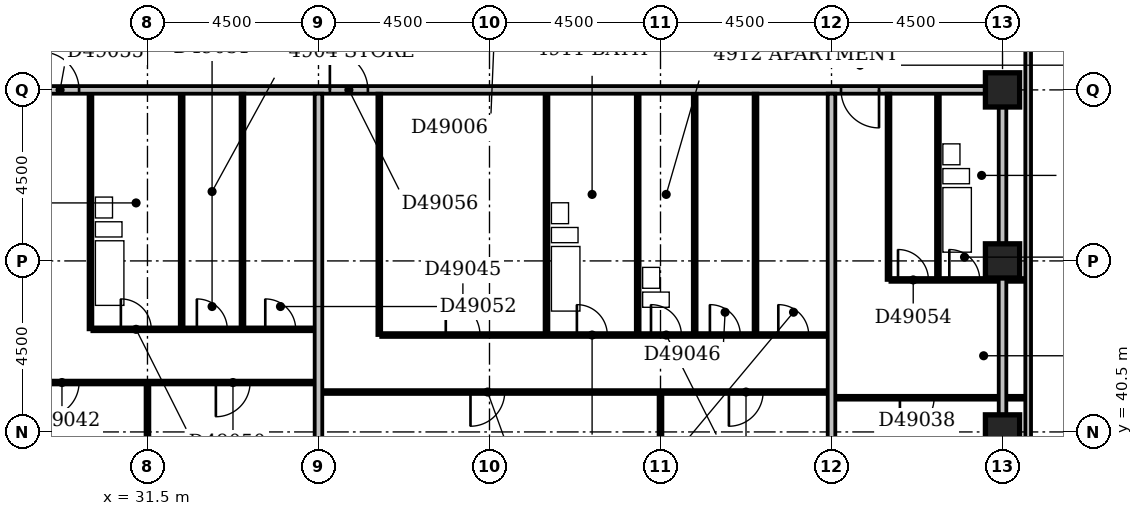
"""IFC4 building model, lengths in metres.
Left out: names, types, materials, properties, quantities, classifications, styles, units other than length and angle.
Written with IfcOpenShell. Run it as: python <this file> out.ifc"""

import sys

from ifc_helpers import new_model, si_unit, direction, frame, frame_2d, origin, origin_2d, place, context, subcontext, project, spatial, rectangle, extrude, element, fill, save


model = new_model("IFC4")
c1 = context("Model", 3, precision=1e-05, world=origin(), true_north=direction((0.0, 1.0)))
c2 = subcontext(c1, "Body", "Model", "MODEL_VIEW")
j1 = project(units=[si_unit("LENGTHUNIT", "METRE"), si_unit("PLANEANGLEUNIT", "RADIAN")], contexts=[c1])
p1 = place(None, origin())
s1 = spatial("IfcSite", under=j1, at=p1, CompositionType="ELEMENT")
p2 = place(p1, origin())
s2 = spatial("IfcBuilding", under=s1, at=p2, CompositionType="ELEMENT")
p3 = place(p2, frame((0.0, 0.0, 193.4)))
s3 = spatial("IfcBuildingStorey", under=s2, at=p3, CompositionType="ELEMENT", Elevation=193.4)
for number, where, z_axis, x_axis in (
    (1, (54.0, 40.5, -0.3), (0.0, 0.0, 1.0), (1.0, 0.0, 0.0)),
    (2, (54.0, 45.0, -0.3), (0.0, 0.0, 1.0), (1.0, 0.0, 0.0)),
    (3, (54.0, 49.5, -0.3), (0.0, 0.0, 1.0), (1.0, 0.0, 0.0)),
):
    element("IfcColumn", number, at=place(p3, frame(where, z_axis=z_axis, x_axis=x_axis)), inside=s3, PredefinedType="COLUMN", context=c2, shape_type="SweptSolid", body=[
        extrude(rectangle(XDim=0.9, YDim=0.9, at=origin_2d()), origin(), (0.0, 0.0, 1.0), 3.6),
    ])
p4 = place(p3, frame((54.675, 39.9, 0.0), z_axis=(0.0, 0.0, 1.0), x_axis=(0.0, 1.0, 0.0)))
e4 = element("IfcWall", 4, at=p4, inside=s3, PredefinedType="STANDARD", context=c2, shape_type="SweptSolid", body=[
    extrude(rectangle(XDim=14.85, YDim=0.15, at=frame_2d((7.425, 0.0))), origin(), (0.0, 0.0, 1.0), 2.7),
])
p5 = place(p3, frame((31.5, 36.45, 0.0), z_axis=(0.0, 0.0, 1.0), x_axis=(0.0, 1.0, 0.0)))
e5 = element("IfcWall", 5, at=p5, inside=s3, PredefinedType="PARTITIONING", context=c2, shape_type="SweptSolid", body=[
    extrude(rectangle(XDim=5.3, YDim=0.1, at=frame_2d((2.65, 0.0))), origin(), (0.0, 0.0, 1.0), 3.3),
])
p6 = place(p3, frame((36.0, 36.45, 0.0), z_axis=(0.0, 0.0, 1.0), x_axis=(0.0, 1.0, 0.0)))
e6 = element("IfcWall", 6, at=p6, inside=s3, PredefinedType="PARTITIONING", context=c2, shape_type="SweptSolid", body=[
    extrude(rectangle(XDim=12.95, YDim=0.2, at=frame_2d((6.475, 0.0))), origin(), (0.0, 0.0, 1.0), 2.4),
])
p7 = place(p3, frame((45.0, 36.45, 0.0), z_axis=(0.0, 0.0, 1.0), x_axis=(0.0, 1.0, 0.0)))
e7 = element("IfcWall", 7, at=p7, inside=s3, PredefinedType="PARTITIONING", context=c2, shape_type="SweptSolid", body=[
    extrude(rectangle(XDim=5.05, YDim=0.1, at=frame_2d((2.525, 0.0))), origin(), (0.0, 0.0, 1.0), 2.6),
])
p8 = place(p3, frame((49.5, 36.45, 0.0), z_axis=(0.0, 0.0, 1.0), x_axis=(0.0, 1.0, 0.0)))
e8 = element("IfcWall", 8, at=p8, inside=s3, PredefinedType="PARTITIONING", context=c2, shape_type="SweptSolid", body=[
    extrude(rectangle(XDim=12.95, YDim=0.2, at=frame_2d((6.475, 0.0))), origin(), (0.0, 0.0, 1.0), 3.3),
])
p9 = place(p3, frame((54.0, 40.95, 0.0), z_axis=(0.0, 0.0, 1.0), x_axis=(0.0, 1.0, 0.0)))
e9 = element("IfcWall", 9, at=p9, inside=s3, PredefinedType="PARTITIONING", context=c2, shape_type="SweptSolid", body=[
    extrude(rectangle(XDim=8.1, YDim=0.2, at=frame_2d((4.05, 0.0))), origin(), (0.0, 0.0, 1.0), 2.7),
])
p10 = place(p3, frame((49.6, 41.4, 0.0), z_axis=(0.0, 0.0, 1.0), x_axis=(1.0, 0.0, 0.0)))
e10 = element("IfcWall", 10, at=p10, inside=s3, PredefinedType="PARTITIONING", context=c2, shape_type="SweptSolid", body=[
    extrude(rectangle(XDim=5.0, YDim=0.1, at=frame_2d((2.5, 0.0))), origin(), (0.0, 0.0, 1.0), 3.3),
])
p11 = place(p10, frame((1.7, 0.0, 0.0)))
e11 = element("IfcOpeningElement", 11, at=p11, cuts=e10, PredefinedType="OPENING", context=c2, shape_type="SweptSolid", body=[
    extrude(rectangle(XDim=0.9, YDim=2.1, at=frame_2d((0.45, 1.05))), frame((0.0, 0.062, 0.0), z_axis=(0.0, -1.0, 0.0), x_axis=(1.0, 0.0, 0.0)), (0.0, 0.0, 1.0), 0.124),
])
p12 = place(p3, frame((36.1, 41.55, 0.0), z_axis=(0.0, 0.0, 1.0), x_axis=(1.0, 0.0, 0.0)))
e12 = element("IfcWall", 12, at=p12, inside=s3, PredefinedType="PARTITIONING", context=c2, shape_type="SweptSolid", body=[
    extrude(rectangle(XDim=13.3, YDim=0.1, at=frame_2d((6.65, 0.0))), origin(), (0.0, 0.0, 1.0), 3.3),
])
p13 = place(p12, frame((3.9, 0.0, 0.0)))
e13 = element("IfcOpeningElement", 13, at=p13, cuts=e12, PredefinedType="OPENING", context=c2, shape_type="SweptSolid", body=[
    extrude(rectangle(XDim=0.9, YDim=2.1, at=frame_2d((0.45, 1.05))), frame((0.0, 0.062, 0.0), z_axis=(0.0, -1.0, 0.0), x_axis=(1.0, 0.0, 0.0)), (0.0, 0.0, 1.0), 0.124),
])
p14 = place(p12, frame((10.7, 0.0, 0.0)))
e14 = element("IfcOpeningElement", 14, at=p14, cuts=e12, PredefinedType="OPENING", context=c2, shape_type="SweptSolid", body=[
    extrude(rectangle(XDim=0.9, YDim=2.1, at=frame_2d((0.45, 1.05))), frame((0.0, 0.062, 0.0), z_axis=(0.0, -1.0, 0.0), x_axis=(1.0, 0.0, 0.0)), (0.0, 0.0, 1.0), 0.124),
])
p15 = place(p3, frame((22.6, 41.8, 0.0), z_axis=(0.0, 0.0, 1.0), x_axis=(1.0, 0.0, 0.0)))
e15 = element("IfcWall", 15, at=p15, inside=s3, PredefinedType="PARTITIONING", context=c2, shape_type="SweptSolid", body=[
    extrude(rectangle(XDim=13.3, YDim=0.1, at=frame_2d((6.65, 0.0))), origin(), (0.0, 0.0, 1.0), 3.3),
])
p16 = place(p15, frame((1.7, 0.0, 0.0)))
e16 = element("IfcOpeningElement", 16, at=p16, cuts=e15, PredefinedType="OPENING", context=c2, shape_type="SweptSolid", body=[
    extrude(rectangle(XDim=0.9, YDim=2.1, at=frame_2d((0.45, 1.05))), frame((0.0, 0.062, 0.0), z_axis=(0.0, -1.0, 0.0), x_axis=(1.0, 0.0, 0.0)), (0.0, 0.0, 1.0), 0.124),
])
p17 = place(p15, frame((6.2, 0.0, 0.0)))
e17 = element("IfcOpeningElement", 17, at=p17, cuts=e15, PredefinedType="OPENING", context=c2, shape_type="SweptSolid", body=[
    extrude(rectangle(XDim=0.9, YDim=2.1, at=frame_2d((0.45, 1.05))), frame((0.0, 0.062, 0.0), z_axis=(0.0, -1.0, 0.0), x_axis=(1.0, 0.0, 0.0)), (0.0, 0.0, 1.0), 0.124),
])
p18 = place(p15, frame((10.7, 0.0, 0.0)))
e18 = element("IfcOpeningElement", 18, at=p18, cuts=e15, PredefinedType="OPENING", context=c2, shape_type="SweptSolid", body=[
    extrude(rectangle(XDim=0.9, YDim=2.1, at=frame_2d((0.45, 1.05))), frame((0.0, 0.062, 0.0), z_axis=(0.0, -1.0, 0.0), x_axis=(1.0, 0.0, 0.0)), (0.0, 0.0, 1.0), 0.124),
])
p19 = place(p3, frame((37.6, 43.05, 0.0), z_axis=(0.0, 0.0, 1.0), x_axis=(0.0, 1.0, 0.0)))
e19 = element("IfcWall", 19, at=p19, inside=s3, PredefinedType="PARTITIONING", context=c2, shape_type="SweptSolid", body=[
    extrude(rectangle(XDim=6.35, YDim=0.1, at=frame_2d((3.175, 0.0))), origin(), (0.0, 0.0, 1.0), 3.3),
])
p20 = place(p3, frame((37.65, 43.05, 0.0), z_axis=(0.0, 0.0, 1.0), x_axis=(1.0, 0.0, 0.0)))
e20 = element("IfcWall", 20, at=p20, inside=s3, PredefinedType="PARTITIONING", context=c2, shape_type="SweptSolid", body=[
    extrude(rectangle(XDim=11.75, YDim=0.1, at=frame_2d((5.875, 0.0))), origin(), (0.0, 0.0, 1.0), 3.3),
])
p21 = place(p20, frame((5.15, 0.0, 0.0)))
e21 = element("IfcOpeningElement", 21, at=p21, cuts=e20, PredefinedType="OPENING", context=c2, shape_type="SweptSolid", body=[
    extrude(rectangle(XDim=0.8, YDim=2.1, at=frame_2d((0.4, 1.05))), frame((0.0, 0.062, 0.0), z_axis=(0.0, -1.0, 0.0), x_axis=(1.0, 0.0, 0.0)), (0.0, 0.0, 1.0), 0.124),
])
p22 = place(p20, frame((1.7, 0.0, 0.0)))
e22 = element("IfcOpeningElement", 22, at=p22, cuts=e20, PredefinedType="OPENING", context=c2, shape_type="SweptSolid", body=[
    extrude(rectangle(XDim=0.9, YDim=2.1, at=frame_2d((0.45, 1.05))), frame((0.0, 0.062, 0.0), z_axis=(0.0, -1.0, 0.0), x_axis=(1.0, 0.0, 0.0)), (0.0, 0.0, 1.0), 0.124),
])
p23 = place(p20, frame((8.65, 0.0, 0.0)))
e23 = element("IfcOpeningElement", 23, at=p23, cuts=e20, PredefinedType="OPENING", context=c2, shape_type="SweptSolid", body=[
    extrude(rectangle(XDim=0.8, YDim=2.1, at=frame_2d((0.4, 1.05))), frame((0.0, 0.062, 0.0), z_axis=(0.0, -1.0, 0.0), x_axis=(1.0, 0.0, 0.0)), (0.0, 0.0, 1.0), 0.124),
])
p24 = place(p20, frame((10.45, 0.0, 0.0)))
e24 = element("IfcOpeningElement", 24, at=p24, cuts=e20, PredefinedType="OPENING", context=c2, shape_type="SweptSolid", body=[
    extrude(rectangle(XDim=0.8, YDim=2.1, at=frame_2d((0.4, 1.05))), frame((0.0, 0.062, 0.0), z_axis=(0.0, -1.0, 0.0), x_axis=(1.0, 0.0, 0.0)), (0.0, 0.0, 1.0), 0.124),
])
p25 = place(p20, frame((7.1, 0.0, 0.0)))
e25 = element("IfcOpeningElement", 25, at=p25, cuts=e20, PredefinedType="OPENING", context=c2, shape_type="SweptSolid", body=[
    extrude(rectangle(XDim=0.8, YDim=2.1, at=frame_2d((0.4, 1.05))), frame((0.0, 0.062, 0.0), z_axis=(0.0, -1.0, 0.0), x_axis=(1.0, 0.0, 0.0)), (0.0, 0.0, 1.0), 0.124),
])
p26 = place(p3, frame((42.0, 43.1, 0.0), z_axis=(0.0, 0.0, 1.0), x_axis=(0.0, 1.0, 0.0)))
e26 = element("IfcWall", 26, at=p26, inside=s3, PredefinedType="PLUMBINGWALL", context=c2, shape_type="SweptSolid", body=[
    extrude(rectangle(XDim=6.3, YDim=0.1, at=frame_2d((3.15, 0.0))), origin(), (0.0, 0.0, 1.0), 3.3),
])
p27 = place(p3, frame((44.4, 43.1, 0.0), z_axis=(0.0, 0.0, 1.0), x_axis=(0.0, 1.0, 0.0)))
e27 = element("IfcWall", 27, at=p27, inside=s3, PredefinedType="PLUMBINGWALL", context=c2, shape_type="SweptSolid", body=[
    extrude(rectangle(XDim=6.3, YDim=0.1, at=frame_2d((3.15, 0.0))), origin(), (0.0, 0.0, 1.0), 2.6),
])
p28 = place(p3, frame((45.9, 43.1, 0.0), z_axis=(0.0, 0.0, 1.0), x_axis=(0.0, 1.0, 0.0)))
e28 = element("IfcWall", 28, at=p28, inside=s3, PredefinedType="PLUMBINGWALL", context=c2, shape_type="SweptSolid", body=[
    extrude(rectangle(XDim=6.3, YDim=0.1, at=frame_2d((3.15, 0.0))), origin(), (0.0, 0.0, 1.0), 3.3),
])
p29 = place(p3, frame((47.5, 43.1, 0.0), z_axis=(0.0, 0.0, 1.0), x_axis=(0.0, 1.0, 0.0)))
e29 = element("IfcWall", 29, at=p29, inside=s3, PredefinedType="PARTITIONING", context=c2, shape_type="SweptSolid", body=[
    extrude(rectangle(XDim=6.3, YDim=0.1, at=frame_2d((3.15, 0.0))), origin(), (0.0, 0.0, 1.0), 3.3),
])
p30 = place(p3, frame((30.0, 43.2, 0.0), z_axis=(0.0, 0.0, 1.0), x_axis=(0.0, 1.0, 0.0)))
e30 = element("IfcWall", 30, at=p30, inside=s3, PredefinedType="PLUMBINGWALL", context=c2, shape_type="SweptSolid", body=[
    extrude(rectangle(XDim=6.2, YDim=0.1, at=frame_2d((3.1, 0.0))), origin(), (0.0, 0.0, 1.0), 3.3),
])
p31 = place(p3, frame((30.05, 43.2, 0.0), z_axis=(0.0, 0.0, 1.0), x_axis=(1.0, 0.0, 0.0)))
e31 = element("IfcWall", 31, at=p31, inside=s3, PredefinedType="PARTITIONING", context=c2, shape_type="SweptSolid", body=[
    extrude(rectangle(XDim=5.85, YDim=0.1, at=frame_2d((2.925, 0.0))), origin(), (0.0, 0.0, 1.0), 3.3),
])
p32 = place(p31, frame((0.75, 0.0, 0.0)))
e32 = element("IfcOpeningElement", 32, at=p32, cuts=e31, PredefinedType="OPENING", context=c2, shape_type="SweptSolid", body=[
    extrude(rectangle(XDim=0.8, YDim=2.1, at=frame_2d((0.4, 1.05))), frame((0.0, 0.062, 0.0), z_axis=(0.0, -1.0, 0.0), x_axis=(1.0, 0.0, 0.0)), (0.0, 0.0, 1.0), 0.124),
])
p33 = place(p31, frame((2.75, 0.0, 0.0)))
e33 = element("IfcOpeningElement", 33, at=p33, cuts=e31, PredefinedType="OPENING", context=c2, shape_type="SweptSolid", body=[
    extrude(rectangle(XDim=0.8, YDim=2.1, at=frame_2d((0.4, 1.05))), frame((0.0, 0.062, 0.0), z_axis=(0.0, -1.0, 0.0), x_axis=(1.0, 0.0, 0.0)), (0.0, 0.0, 1.0), 0.124),
])
p34 = place(p31, frame((4.55, 0.0, 0.0)))
e34 = element("IfcOpeningElement", 34, at=p34, cuts=e31, PredefinedType="OPENING", context=c2, shape_type="SweptSolid", body=[
    extrude(rectangle(XDim=0.8, YDim=2.1, at=frame_2d((0.4, 1.05))), frame((0.0, 0.062, 0.0), z_axis=(0.0, -1.0, 0.0), x_axis=(1.0, 0.0, 0.0)), (0.0, 0.0, 1.0), 0.124),
])
p35 = place(p3, frame((32.4, 43.25, 0.0), z_axis=(0.0, 0.0, 1.0), x_axis=(0.0, 1.0, 0.0)))
e35 = element("IfcWall", 35, at=p35, inside=s3, PredefinedType="PLUMBINGWALL", context=c2, shape_type="SweptSolid", body=[
    extrude(rectangle(XDim=6.15, YDim=0.1, at=frame_2d((3.075, 0.0))), origin(), (0.0, 0.0, 1.0), 3.3),
])
p36 = place(p3, frame((34.0, 43.25, 0.0), z_axis=(0.0, 0.0, 1.0), x_axis=(0.0, 1.0, 0.0)))
e36 = element("IfcWall", 36, at=p36, inside=s3, PredefinedType="PARTITIONING", context=c2, shape_type="SweptSolid", body=[
    extrude(rectangle(XDim=6.15, YDim=0.1, at=frame_2d((3.075, 0.0))), origin(), (0.0, 0.0, 1.0), 3.3),
])
p37 = place(p3, frame((51.0, 44.5, 0.0), z_axis=(0.0, 0.0, 1.0), x_axis=(0.0, 1.0, 0.0)))
e37 = element("IfcWall", 37, at=p37, inside=s3, PredefinedType="PARTITIONING", context=c2, shape_type="SweptSolid", body=[
    extrude(rectangle(XDim=4.9, YDim=0.1, at=frame_2d((2.45, 0.0))), origin(), (0.0, 0.0, 1.0), 3.3),
])
p38 = place(p3, frame((51.05, 44.5, 0.0), z_axis=(0.0, 0.0, 1.0), x_axis=(1.0, 0.0, 0.0)))
e38 = element("IfcWall", 38, at=p38, inside=s3, PredefinedType="PARTITIONING", context=c2, shape_type="SweptSolid", body=[
    extrude(rectangle(XDim=3.55, YDim=0.1, at=frame_2d((1.775, 0.0))), origin(), (0.0, 0.0, 1.0), 3.3),
])
p39 = place(p38, frame((1.55, 0.0, 0.0)))
e39 = element("IfcOpeningElement", 39, at=p39, cuts=e38, PredefinedType="OPENING", context=c2, shape_type="SweptSolid", body=[
    extrude(rectangle(XDim=0.8, YDim=2.1, at=frame_2d((0.4, 1.05))), frame((0.0, 0.062, 0.0), z_axis=(0.0, -1.0, 0.0), x_axis=(1.0, 0.0, 0.0)), (0.0, 0.0, 1.0), 0.124),
])
p40 = place(p38, frame((0.2, 0.0, 0.0)))
e40 = element("IfcOpeningElement", 40, at=p40, cuts=e38, PredefinedType="OPENING", context=c2, shape_type="SweptSolid", body=[
    extrude(rectangle(XDim=0.8, YDim=2.1, at=frame_2d((0.4, 1.05))), frame((0.0, 0.062, 0.0), z_axis=(0.0, -1.0, 0.0), x_axis=(1.0, 0.0, 0.0)), (0.0, 0.0, 1.0), 0.124),
])
p41 = place(p3, frame((52.3, 44.55, 0.0), z_axis=(0.0, 0.0, 1.0), x_axis=(0.0, 1.0, 0.0)))
e41 = element("IfcWall", 41, at=p41, inside=s3, PredefinedType="PLUMBINGWALL", context=c2, shape_type="SweptSolid", body=[
    extrude(rectangle(XDim=4.85, YDim=0.1, at=frame_2d((2.425, 0.0))), origin(), (0.0, 0.0, 1.0), 3.3),
])
p42 = place(p3, frame((22.6, 49.5, 0.0), z_axis=(0.0, 0.0, 1.0), x_axis=(1.0, 0.0, 0.0)))
e42 = element("IfcWall", 42, at=p42, inside=s3, PredefinedType="PARTITIONING", context=c2, shape_type="SweptSolid", body=[
    extrude(rectangle(XDim=30.95, YDim=0.2, at=frame_2d((15.475, 0.0))), origin(), (0.0, 0.0, 1.0), 3.3),
])
p43 = place(p42, frame((6.1, 0.0, 0.0)))
e43 = element("IfcOpeningElement", 43, at=p43, cuts=e42, PredefinedType="OPENING", context=c2, shape_type="SweptSolid", body=[
    extrude(rectangle(XDim=1.0, YDim=2.1, at=frame_2d((0.5, 1.05))), frame((0.0, 0.112, 0.0), z_axis=(0.0, -1.0, 0.0), x_axis=(1.0, 0.0, 0.0)), (0.0, 0.0, 1.0), 0.224),
])
p44 = place(p42, frame((13.7, 0.0, 0.0)))
e44 = element("IfcOpeningElement", 44, at=p44, cuts=e42, PredefinedType="OPENING", context=c2, shape_type="SweptSolid", body=[
    extrude(rectangle(XDim=1.0, YDim=2.1, at=frame_2d((0.5, 1.05))), frame((0.0, 0.112, 0.0), z_axis=(0.0, -1.0, 0.0), x_axis=(1.0, 0.0, 0.0)), (0.0, 0.0, 1.0), 0.224),
])
p45 = place(p42, frame((27.15, 0.0, 0.0)))
e45 = element("IfcOpeningElement", 45, at=p45, cuts=e42, PredefinedType="OPENING", context=c2, shape_type="SweptSolid", body=[
    extrude(rectangle(XDim=1.0, YDim=2.1, at=frame_2d((0.5, 1.05))), frame((0.0, 0.112, 0.0), z_axis=(0.0, -1.0, 0.0), x_axis=(1.0, 0.0, 0.0)), (0.0, 0.0, 1.0), 0.224),
])
p46 = place(p11, frame((0.9, 0.0, 0.0), z_axis=(0.0, 0.0, 1.0), x_axis=(-1.0, 0.0, 0.0)))
e46 = element("IfcDoor", 46, at=p46, inside=s3, OperationType="SINGLE_SWING_RIGHT", PredefinedType="DOOR", context=c2, shape_type="SweptSolid", body=[
    extrude(rectangle(XDim=0.9, YDim=2.1, at=frame_2d((0.45, 1.05))), frame((0.0, 0.025, 0.0), z_axis=(0.0, -1.0, 0.0), x_axis=(1.0, 0.0, 0.0)), (0.0, 0.0, 1.0), 0.05),
])
fill(e11, e46)
p47 = place(p13, frame((0.9, 0.0, 0.0), z_axis=(0.0, 0.0, 1.0), x_axis=(-1.0, 0.0, 0.0)))
e47 = element("IfcDoor", 47, at=p47, inside=s3, OperationType="SINGLE_SWING_RIGHT", PredefinedType="DOOR", context=c2, shape_type="SweptSolid", body=[
    extrude(rectangle(XDim=0.9, YDim=2.1, at=frame_2d((0.45, 1.05))), frame((0.0, 0.025, 0.0), z_axis=(0.0, -1.0, 0.0), x_axis=(1.0, 0.0, 0.0)), (0.0, 0.0, 1.0), 0.05),
])
fill(e13, e47)
p48 = place(p14, frame((0.9, 0.0, 0.0), z_axis=(0.0, 0.0, 1.0), x_axis=(-1.0, 0.0, 0.0)))
e48 = element("IfcDoor", 48, at=p48, inside=s3, OperationType="SINGLE_SWING_RIGHT", PredefinedType="DOOR", context=c2, shape_type="SweptSolid", body=[
    extrude(rectangle(XDim=0.9, YDim=2.1, at=frame_2d((0.45, 1.05))), frame((0.0, 0.025, 0.0), z_axis=(0.0, -1.0, 0.0), x_axis=(1.0, 0.0, 0.0)), (0.0, 0.0, 1.0), 0.05),
])
fill(e14, e48)
p49 = place(p17, frame((0.9, 0.0, 0.0), z_axis=(0.0, 0.0, 1.0), x_axis=(-1.0, 0.0, 0.0)))
e49 = element("IfcDoor", 49, at=p49, inside=s3, OperationType="SINGLE_SWING_RIGHT", PredefinedType="DOOR", context=c2, shape_type="SweptSolid", body=[
    extrude(rectangle(XDim=0.9, YDim=2.1, at=frame_2d((0.45, 1.05))), frame((0.0, 0.025, 0.0), z_axis=(0.0, -1.0, 0.0), x_axis=(1.0, 0.0, 0.0)), (0.0, 0.0, 1.0), 0.05),
])
fill(e17, e49)
p50 = place(p18, frame((0.9, 0.0, 0.0), z_axis=(0.0, 0.0, 1.0), x_axis=(-1.0, 0.0, 0.0)))
e50 = element("IfcDoor", 50, at=p50, inside=s3, OperationType="SINGLE_SWING_RIGHT", PredefinedType="DOOR", context=c2, shape_type="SweptSolid", body=[
    extrude(rectangle(XDim=0.9, YDim=2.1, at=frame_2d((0.45, 1.05))), frame((0.0, 0.025, 0.0), z_axis=(0.0, -1.0, 0.0), x_axis=(1.0, 0.0, 0.0)), (0.0, 0.0, 1.0), 0.05),
])
fill(e18, e50)
p51 = place(p21, origin())
e51 = element("IfcDoor", 51, at=p51, inside=s3, OperationType="SINGLE_SWING_LEFT", PredefinedType="DOOR", context=c2, shape_type="SweptSolid", body=[
    extrude(rectangle(XDim=0.8, YDim=2.1, at=frame_2d((0.4, 1.05))), frame((0.0, 0.025, 0.0), z_axis=(0.0, -1.0, 0.0), x_axis=(1.0, 0.0, 0.0)), (0.0, 0.0, 1.0), 0.05),
])
fill(e21, e51)
p52 = place(p22, origin())
e52 = element("IfcDoor", 52, at=p52, inside=s3, OperationType="SINGLE_SWING_LEFT", PredefinedType="DOOR", context=c2, shape_type="SweptSolid", body=[
    extrude(rectangle(XDim=0.9, YDim=2.1, at=frame_2d((0.45, 1.05))), frame((0.0, 0.025, 0.0), z_axis=(0.0, -1.0, 0.0), x_axis=(1.0, 0.0, 0.0)), (0.0, 0.0, 1.0), 0.05),
])
fill(e22, e52)
p53 = place(p23, origin())
e53 = element("IfcDoor", 53, at=p53, inside=s3, OperationType="SINGLE_SWING_LEFT", PredefinedType="DOOR", context=c2, shape_type="SweptSolid", body=[
    extrude(rectangle(XDim=0.8, YDim=2.1, at=frame_2d((0.4, 1.05))), frame((0.0, 0.025, 0.0), z_axis=(0.0, -1.0, 0.0), x_axis=(1.0, 0.0, 0.0)), (0.0, 0.0, 1.0), 0.05),
])
fill(e23, e53)
p54 = place(p24, origin())
e54 = element("IfcDoor", 54, at=p54, inside=s3, OperationType="SINGLE_SWING_LEFT", PredefinedType="DOOR", context=c2, shape_type="SweptSolid", body=[
    extrude(rectangle(XDim=0.8, YDim=2.1, at=frame_2d((0.4, 1.05))), frame((0.0, 0.025, 0.0), z_axis=(0.0, -1.0, 0.0), x_axis=(1.0, 0.0, 0.0)), (0.0, 0.0, 1.0), 0.05),
])
fill(e24, e54)
p55 = place(p25, origin())
e55 = element("IfcDoor", 55, at=p55, inside=s3, OperationType="SINGLE_SWING_LEFT", PredefinedType="DOOR", context=c2, shape_type="SweptSolid", body=[
    extrude(rectangle(XDim=0.8, YDim=2.1, at=frame_2d((0.4, 1.05))), frame((0.0, 0.025, 0.0), z_axis=(0.0, -1.0, 0.0), x_axis=(1.0, 0.0, 0.0)), (0.0, 0.0, 1.0), 0.05),
])
fill(e25, e55)
p56 = place(p32, origin())
e56 = element("IfcDoor", 56, at=p56, inside=s3, OperationType="SINGLE_SWING_LEFT", PredefinedType="DOOR", context=c2, shape_type="SweptSolid", body=[
    extrude(rectangle(XDim=0.8, YDim=2.1, at=frame_2d((0.4, 1.05))), frame((0.0, 0.025, 0.0), z_axis=(0.0, -1.0, 0.0), x_axis=(1.0, 0.0, 0.0)), (0.0, 0.0, 1.0), 0.05),
])
fill(e32, e56)
p57 = place(p33, origin())
e57 = element("IfcDoor", 57, at=p57, inside=s3, OperationType="SINGLE_SWING_LEFT", PredefinedType="DOOR", context=c2, shape_type="SweptSolid", body=[
    extrude(rectangle(XDim=0.8, YDim=2.1, at=frame_2d((0.4, 1.05))), frame((0.0, 0.025, 0.0), z_axis=(0.0, -1.0, 0.0), x_axis=(1.0, 0.0, 0.0)), (0.0, 0.0, 1.0), 0.05),
])
fill(e33, e57)
p58 = place(p34, origin())
e58 = element("IfcDoor", 58, at=p58, inside=s3, OperationType="SINGLE_SWING_LEFT", PredefinedType="DOOR", context=c2, shape_type="SweptSolid", body=[
    extrude(rectangle(XDim=0.8, YDim=2.1, at=frame_2d((0.4, 1.05))), frame((0.0, 0.025, 0.0), z_axis=(0.0, -1.0, 0.0), x_axis=(1.0, 0.0, 0.0)), (0.0, 0.0, 1.0), 0.05),
])
fill(e34, e58)
p59 = place(p39, origin())
e59 = element("IfcDoor", 59, at=p59, inside=s3, OperationType="SINGLE_SWING_LEFT", PredefinedType="DOOR", context=c2, shape_type="SweptSolid", body=[
    extrude(rectangle(XDim=0.8, YDim=2.1, at=frame_2d((0.4, 1.05))), frame((0.0, 0.025, 0.0), z_axis=(0.0, -1.0, 0.0), x_axis=(1.0, 0.0, 0.0)), (0.0, 0.0, 1.0), 0.05),
])
fill(e39, e59)
p60 = place(p40, origin())
e60 = element("IfcDoor", 60, at=p60, inside=s3, OperationType="SINGLE_SWING_LEFT", PredefinedType="DOOR", context=c2, shape_type="SweptSolid", body=[
    extrude(rectangle(XDim=0.8, YDim=2.1, at=frame_2d((0.4, 1.05))), frame((0.0, 0.025, 0.0), z_axis=(0.0, -1.0, 0.0), x_axis=(1.0, 0.0, 0.0)), (0.0, 0.0, 1.0), 0.05),
])
fill(e40, e60)
p61 = place(p43, origin())
e61 = element("IfcDoor", 61, at=p61, inside=s3, OperationType="SINGLE_SWING_LEFT", PredefinedType="DOOR", context=c2, shape_type="SweptSolid", body=[
    extrude(rectangle(XDim=1.0, YDim=2.1, at=frame_2d((0.5, 1.05))), frame((0.0, 0.025, 0.0), z_axis=(0.0, -1.0, 0.0), x_axis=(1.0, 0.0, 0.0)), (0.0, 0.0, 1.0), 0.05),
])
fill(e43, e61)
p62 = place(p44, origin())
e62 = element("IfcDoor", 62, at=p62, inside=s3, OperationType="SINGLE_SWING_LEFT", PredefinedType="DOOR", context=c2, shape_type="SweptSolid", body=[
    extrude(rectangle(XDim=1.0, YDim=2.1, at=frame_2d((0.5, 1.05))), frame((0.0, 0.025, 0.0), z_axis=(0.0, -1.0, 0.0), x_axis=(1.0, 0.0, 0.0)), (0.0, 0.0, 1.0), 0.05),
])
fill(e44, e62)
p63 = place(p45, origin())
e63 = element("IfcDoor", 63, at=p63, inside=s3, OperationType="SINGLE_SWING_RIGHT", PredefinedType="DOOR", context=c2, shape_type="SweptSolid", body=[
    extrude(rectangle(XDim=1.0, YDim=2.1, at=frame_2d((0.5, 1.05))), frame((0.0, 0.025, 0.0), z_axis=(0.0, -1.0, 0.0), x_axis=(1.0, 0.0, 0.0)), (0.0, 0.0, 1.0), 0.05),
])
fill(e45, e63)
save(model, sys.argv[1])
